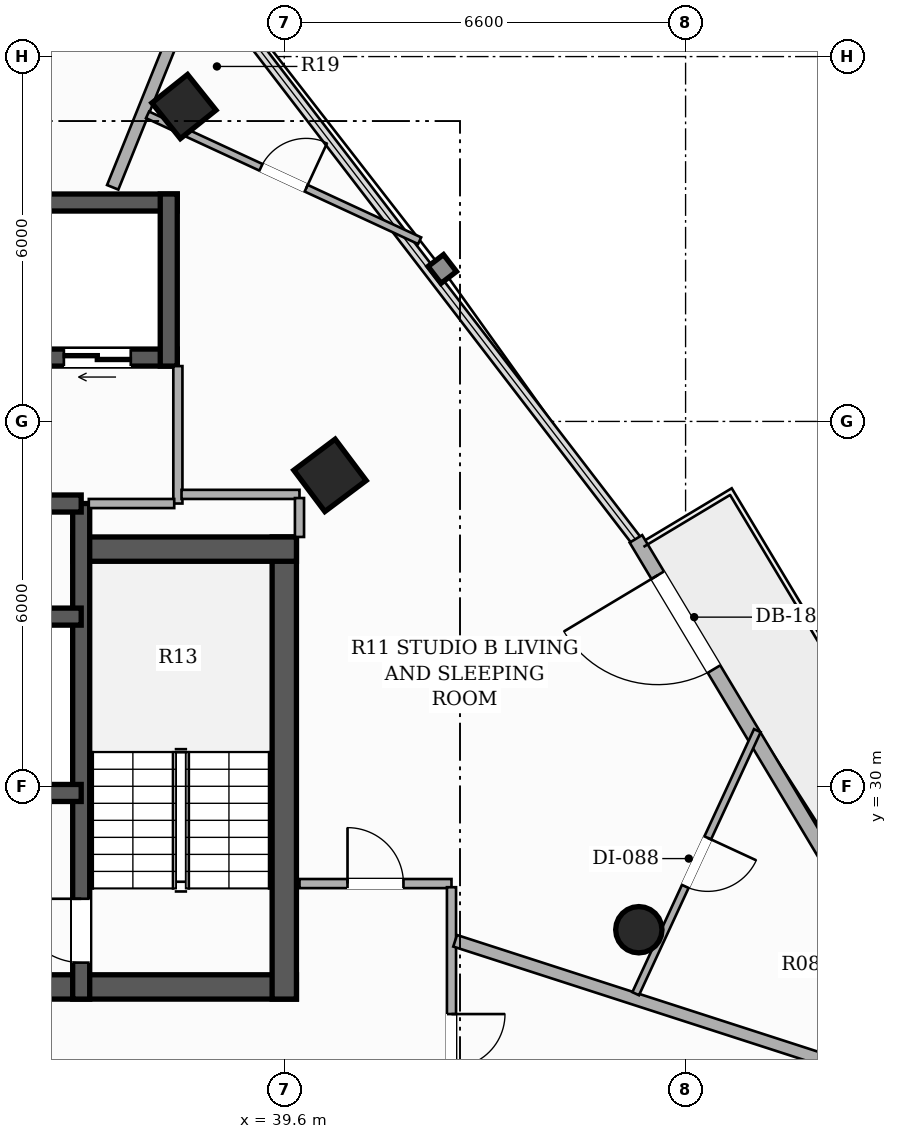
"""IFC4 building model, lengths in metres.
Left out: names, types, materials, properties, quantities, classifications, styles, units other than length and angle.
Written with IfcOpenShell. Run it as: python <this file> out.ifc"""

import sys

from ifc_helpers import new_model, si_unit, direction, frame, frame_2d, origin, origin_2d, place, context, subcontext, project, spatial, rectangle, hollow_rectangle, hollow_circle, extrude, element, fill, save


model = new_model("IFC4")
c1 = context("Model", 3, precision=1e-05, world=origin(), true_north=direction((0.0, 1.0)))
c2 = subcontext(c1, "Body", "Model", "MODEL_VIEW")
j1 = project(units=[si_unit("LENGTHUNIT", "METRE"), si_unit("PLANEANGLEUNIT", "RADIAN")], contexts=[c1])
p1 = place(None, origin())
s1 = spatial("IfcSite", under=j1, at=p1, CompositionType="ELEMENT")
p2 = place(p1, origin())
s2 = spatial("IfcBuilding", under=s1, at=p2, CompositionType="ELEMENT")
p3 = place(p2, frame((0.0, 0.0, 157.25)))
s3 = spatial("IfcBuildingStorey", under=s2, at=p3, CompositionType="ELEMENT", Elevation=157.25)
p4 = place(p3, frame((26.2, 26.7, 0.0), z_axis=(0.0, 0.0, 1.0), x_axis=(1.0, 0.0, 0.0)))
e1 = element("IfcWall", 1, at=p4, inside=s3, PredefinedType="SHEAR", context=c2, shape_type="SweptSolid", body=[
    extrude(rectangle(XDim=13.6, YDim=0.4, at=frame_2d((6.8, 0.0))), origin(), (0.0, 0.0, 1.0), 3.3),
])
p5 = place(p4, frame((4.35, 0.0, 0.0)))
e2 = element("IfcOpeningElement", 2, at=p5, cuts=e1, PredefinedType="OPENING", context=c2, shape_type="SweptSolid", body=[
    extrude(rectangle(XDim=1.05, YDim=2.15, at=frame_2d((0.525, 1.075))), frame((0.0, 0.21, 0.0), z_axis=(0.0, -1.0, 0.0), x_axis=(1.0, 0.0, 0.0)), (0.0, 0.0, 1.0), 0.42),
])
p6 = place(p4, frame((8.3, 0.0, 0.0)))
e3 = element("IfcOpeningElement", 3, at=p6, cuts=e1, PredefinedType="OPENING", context=c2, shape_type="SweptSolid", body=[
    extrude(rectangle(XDim=1.05, YDim=2.15, at=frame_2d((0.525, 1.075))), frame((0.0, 0.21, 0.0), z_axis=(0.0, -1.0, 0.0), x_axis=(1.0, 0.0, 0.0)), (0.0, 0.0, 1.0), 0.42),
])
p7 = place(p3, frame((39.6, 26.5, 0.0), z_axis=(0.0, 0.0, 1.0), x_axis=(0.0, 1.0, 0.0)))
e4 = element("IfcWall", 4, at=p7, inside=s3, PredefinedType="SHEAR", context=c2, shape_type="SweptSolid", body=[
    extrude(rectangle(XDim=7.6, YDim=0.4, at=frame_2d((3.8, 0.0))), origin(), (0.0, 0.0, 1.0), 3.3),
])
p8 = place(p3, frame((36.12, 33.9, 0.0), z_axis=(0.0, 0.0, 1.0), x_axis=(1.0, 0.0, 0.0)))
e5 = element("IfcWall", 5, at=p8, inside=s3, PredefinedType="SHEAR", context=c2, shape_type="SweptSolid", body=[
    extrude(rectangle(XDim=3.68, YDim=0.4, at=frame_2d((1.84, 0.0))), origin(), (0.0, 0.0, 1.0), 3.3),
])
p9 = place(p3, frame((36.26, 26.5, 0.0), z_axis=(0.0, 0.0, 1.0), x_axis=(0.0, 1.0, 0.0)))
e6 = element("IfcWall", 6, at=p9, inside=s3, PredefinedType="SHEAR", context=c2, shape_type="SweptSolid", body=[
    extrude(rectangle(XDim=8.15, YDim=0.28, at=frame_2d((4.075, 0.0))), origin(), (0.0, 0.0, 1.0), 3.3),
])
p10 = place(p9, frame((0.6, 0.0, 0.0)))
e7 = element("IfcOpeningElement", 7, at=p10, cuts=e6, PredefinedType="OPENING", context=c2, shape_type="SweptSolid", body=[
    extrude(rectangle(XDim=1.05, YDim=2.15, at=frame_2d((0.525, 1.075))), frame((0.0, 0.15, 0.0), z_axis=(0.0, -1.0, 0.0), x_axis=(1.0, 0.0, 0.0)), (0.0, 0.0, 1.0), 0.3),
])
p11 = place(p3, frame((36.26, 29.89, 0.0), z_axis=(0.0, 0.0, 1.0), x_axis=(-1.0, 0.0, 0.0)))
e8 = element("IfcWall", 8, at=p11, inside=s3, PredefinedType="SHEAR", context=c2, shape_type="SweptSolid", body=[
    extrude(rectangle(XDim=6.52, YDim=0.28, at=frame_2d((3.26, 0.0))), origin(), (0.0, 0.0, 1.0), 3.3),
])
p12 = place(p11, frame((4.875, 0.0, 0.0)))
e9 = element("IfcOpeningElement", 9, at=p12, cuts=e8, PredefinedType="OPENING", context=c2, shape_type="SweptSolid", body=[
    extrude(rectangle(XDim=1.1, YDim=2.2, at=frame_2d((0.55, 1.1))), frame((0.0, 0.15, 0.0), z_axis=(0.0, -1.0, 0.0), x_axis=(1.0, 0.0, 0.0)), (0.0, 0.0, 1.0), 0.3),
])
p13 = place(p11, frame((2.875, 0.0, 0.0)))
e10 = element("IfcOpeningElement", 10, at=p13, cuts=e8, PredefinedType="OPENING", context=c2, shape_type="SweptSolid", body=[
    extrude(rectangle(XDim=1.1, YDim=2.2, at=frame_2d((0.55, 1.1))), frame((0.0, 0.15, 0.0), z_axis=(0.0, -1.0, 0.0), x_axis=(1.0, 0.0, 0.0)), (0.0, 0.0, 1.0), 0.3),
])
p14 = place(p11, frame((0.6, 0.0, 0.0)))
e11 = element("IfcOpeningElement", 11, at=p14, cuts=e8, PredefinedType="OPENING", context=c2, shape_type="SweptSolid", body=[
    extrude(rectangle(XDim=1.3, YDim=2.2, at=frame_2d((0.65, 1.1))), frame((0.0, 0.15, 0.0), z_axis=(0.0, -1.0, 0.0), x_axis=(1.0, 0.0, 0.0)), (0.0, 0.0, 1.0), 0.3),
])
p15 = place(p3, frame((29.74, 32.79, 0.0), z_axis=(0.0, 0.0, 1.0), x_axis=(1.0, 0.0, 0.0)))
e12 = element("IfcWall", 12, at=p15, inside=s3, PredefinedType="SHEAR", context=c2, shape_type="SweptSolid", body=[
    extrude(rectangle(XDim=6.52, YDim=0.28, at=frame_2d((3.26, 0.0))), origin(), (0.0, 0.0, 1.0), 3.3),
])
p16 = place(p3, frame((29.74, 34.65, 0.0), z_axis=(0.0, 0.0, 1.0), x_axis=(1.0, 0.0, 0.0)))
e13 = element("IfcWall", 13, at=p16, inside=s3, PredefinedType="SHEAR", context=c2, shape_type="SweptSolid", body=[
    extrude(rectangle(XDim=6.52, YDim=0.28, at=frame_2d((3.26, 0.0))), origin(), (0.0, 0.0, 1.0), 3.3),
])
p17 = place(p16, frame((0.515, 0.0, 0.0)))
e14 = element("IfcOpeningElement", 14, at=p17, cuts=e13, PredefinedType="OPENING", context=c2, shape_type="SweptSolid", body=[
    extrude(rectangle(XDim=0.82, YDim=2.1, at=frame_2d((0.41, 1.05))), frame((0.0, 0.15, 0.0), z_axis=(0.0, -1.0, 0.0), x_axis=(1.0, 0.0, 0.0)), (0.0, 0.0, 1.0), 0.3),
])
p18 = place(p16, frame((2.065, 0.0, 0.0)))
e15 = element("IfcOpeningElement", 15, at=p18, cuts=e13, PredefinedType="OPENING", context=c2, shape_type="SweptSolid", body=[
    extrude(rectangle(XDim=0.82, YDim=2.1, at=frame_2d((0.41, 1.05))), frame((0.0, 0.15, 0.0), z_axis=(0.0, -1.0, 0.0), x_axis=(1.0, 0.0, 0.0)), (0.0, 0.0, 1.0), 0.3),
])
p19 = place(p16, frame((3.615, 0.0, 0.0)))
e16 = element("IfcOpeningElement", 16, at=p19, cuts=e13, PredefinedType="OPENING", context=c2, shape_type="SweptSolid", body=[
    extrude(rectangle(XDim=0.82, YDim=2.1, at=frame_2d((0.41, 1.05))), frame((0.0, 0.15, 0.0), z_axis=(0.0, -1.0, 0.0), x_axis=(1.0, 0.0, 0.0)), (0.0, 0.0, 1.0), 0.3),
])
p20 = place(p16, frame((5.165, 0.0, 0.0)))
e17 = element("IfcOpeningElement", 17, at=p20, cuts=e13, PredefinedType="OPENING", context=c2, shape_type="SweptSolid", body=[
    extrude(rectangle(XDim=0.82, YDim=2.1, at=frame_2d((0.41, 1.05))), frame((0.0, 0.15, 0.0), z_axis=(0.0, -1.0, 0.0), x_axis=(1.0, 0.0, 0.0)), (0.0, 0.0, 1.0), 0.3),
])
p21 = place(p3, frame((37.84, 37.05, 0.0), z_axis=(0.0, 0.0, 1.0), x_axis=(-1.0, 0.0, 0.0)))
e18 = element("IfcWall", 18, at=p21, inside=s3, PredefinedType="SHEAR", context=c2, shape_type="SweptSolid", body=[
    extrude(rectangle(XDim=9.68, YDim=0.28, at=frame_2d((4.84, 0.0))), origin(), (0.0, 0.0, 1.0), 3.3),
])
p22 = place(p21, frame((7.815, 0.0, 0.0)))
e19 = element("IfcOpeningElement", 19, at=p22, cuts=e18, PredefinedType="OPENING", context=c2, shape_type="SweptSolid", body=[
    extrude(rectangle(XDim=1.1, YDim=2.2, at=frame_2d((0.55, 1.1))), frame((0.0, 0.15, 0.0), z_axis=(0.0, -1.0, 0.0), x_axis=(1.0, 0.0, 0.0)), (0.0, 0.0, 1.0), 0.3),
])
p23 = place(p21, frame((0.765, 0.0, 0.0)))
e20 = element("IfcOpeningElement", 20, at=p23, cuts=e18, PredefinedType="OPENING", context=c2, shape_type="SweptSolid", body=[
    extrude(rectangle(XDim=1.1, YDim=2.2, at=frame_2d((0.55, 1.1))), frame((0.0, 0.15, 0.0), z_axis=(0.0, -1.0, 0.0), x_axis=(1.0, 0.0, 0.0)), (0.0, 0.0, 1.0), 0.3),
])
p24 = place(p3, frame((28.16, 39.6, 0.0), z_axis=(0.0, 0.0, 1.0), x_axis=(1.0, 0.0, 0.0)))
e21 = element("IfcWall", 21, at=p24, inside=s3, PredefinedType="SHEAR", context=c2, shape_type="SweptSolid", body=[
    extrude(rectangle(XDim=9.68, YDim=0.28, at=frame_2d((4.84, 0.0))), origin(), (0.0, 0.0, 1.0), 3.3),
])
p25 = place(p3, frame((37.7, 36.91, 0.0), z_axis=(0.0, 0.0, 1.0), x_axis=(0.0, 1.0, 0.0)))
e22 = element("IfcWall", 22, at=p25, inside=s3, PredefinedType="SHEAR", context=c2, shape_type="SweptSolid", body=[
    extrude(rectangle(XDim=2.83, YDim=0.28, at=frame_2d((1.415, 0.0))), origin(), (0.0, 0.0, 1.0), 3.3),
])
p26 = place(p3, frame((45.431, 27.641, 0.0), z_axis=(0.0, 0.0, 1.0), x_axis=(1.0, 0.0, 0.0)))
e23 = element("IfcColumn", 23, at=p26, inside=s3, PredefinedType="COLUMN", context=c2, shape_type="SweptSolid", body=[
    extrude(hollow_circle(Radius=0.381, WallThickness=0.022, at=origin_2d()), origin(), (0.0, 0.0, 1.0), 3.3),
])
p27 = place(p3, frame((40.352, 35.113, 0.0), z_axis=(0.0, 0.0, 1.0), x_axis=(-0.600420225326, 0.799684658487, 0.0)))
e24 = element("IfcColumn", 24, at=p27, inside=s3, PredefinedType="COLUMN", context=c2, shape_type="SweptSolid", body=[
    extrude(hollow_rectangle(XDim=0.85, YDim=0.85, WallThickness=0.028, at=origin_2d()), origin(), (0.0, 0.0, 1.0), 3.3),
])
p28 = place(p3, frame((37.95, 41.178, 0.0), z_axis=(0.0, 0.0, 1.0), x_axis=(-0.623879596709, 0.781520472419, 0.0)))
e25 = element("IfcColumn", 25, at=p28, inside=s3, PredefinedType="COLUMN", context=c2, shape_type="SweptSolid", body=[
    extrude(hollow_rectangle(XDim=0.75, YDim=0.75, WallThickness=0.025, at=origin_2d()), origin(), (0.0, 0.0, 1.0), 3.3),
])
p29 = place(p3, frame((51.155, 24.445, 0.0), z_axis=(0.0, 0.0, 1.0), x_axis=(-0.514335781973, 0.857588889493, 0.0)))
e26 = element("IfcWall", 26, at=p29, inside=s3, PredefinedType="SOLIDWALL", context=c2, shape_type="SweptSolid", body=[
    extrude(rectangle(XDim=11.222, YDim=0.24, at=frame_2d((5.611, 0.0))), origin(), (0.0, 0.0, 1.0), 2.624),
])
p30 = place(p29, frame((8.725, 0.0, 0.0)))
e27 = element("IfcOpeningElement", 27, at=p30, cuts=e26, PredefinedType="OPENING", context=c2, shape_type="SweptSolid", body=[
    extrude(rectangle(XDim=1.8, YDim=2.2, at=frame_2d((0.9, 1.1))), frame((0.0, 0.13, 0.0), z_axis=(0.0, -1.0, 0.0), x_axis=(1.0, 0.0, 0.0)), (0.0, 0.0, 1.0), 0.26),
])
p31 = place(p3, frame((37.85, 34.65, 0.0), z_axis=(0.0, 0.0, 1.0), x_axis=(0.0, 1.0, 0.0)))
e28 = element("IfcWall", 28, at=p31, inside=s3, PredefinedType="PARTITIONING", context=c2, shape_type="SweptSolid", body=[
    extrude(rectangle(XDim=2.26, YDim=0.15, at=frame_2d((1.13, 0.0))), origin(), (0.0, 0.0, 1.0), 3.06),
])
p32 = place(p3, frame((36.385, 34.65, 0.0), z_axis=(0.0, 0.0, 1.0), x_axis=(1.0, 0.0, 0.0)))
e29 = element("IfcWall", 29, at=p32, inside=s3, PredefinedType="PARTITIONING", context=c2, shape_type="SweptSolid", body=[
    extrude(rectangle(XDim=1.405, YDim=0.15, at=frame_2d((0.703, 0.0))), origin(), (0.0, 0.0, 1.0), 2.425),
])
p33 = place(p3, frame((39.85, 28.4, 0.0), z_axis=(0.0, 0.0, 1.0), x_axis=(1.0, 0.0, 0.0)))
e30 = element("IfcWall", 30, at=p33, inside=s3, PredefinedType="PARTITIONING", context=c2, shape_type="SweptSolid", body=[
    extrude(rectangle(XDim=2.5, YDim=0.15, at=frame_2d((1.25, 0.0))), origin(), (0.0, 0.0, 1.0), 2.721),
])
p34 = place(p33, frame((0.79, 0.0, 0.0)))
e31 = element("IfcOpeningElement", 31, at=p34, cuts=e30, PredefinedType="OPENING", context=c2, shape_type="SweptSolid", body=[
    extrude(rectangle(XDim=0.92, YDim=2.15, at=frame_2d((0.46, 1.075))), frame((0.0, 0.085, 0.0), z_axis=(0.0, -1.0, 0.0), x_axis=(1.0, 0.0, 0.0)), (0.0, 0.0, 1.0), 0.17),
])
p35 = place(p3, frame((42.35, 28.34, 0.0), z_axis=(0.0, 0.0, 1.0), x_axis=(0.0, -1.0, 0.0)))
e32 = element("IfcWall", 32, at=p35, inside=s3, PredefinedType="PARTITIONING", context=c2, shape_type="SweptSolid", body=[
    extrude(rectangle(XDim=4.49, YDim=0.15, at=frame_2d((2.245, 0.0))), origin(), (0.0, 0.0, 1.0), 2.721),
])
p36 = place(p35, frame((2.086, 0.0, 0.0)))
e33 = element("IfcOpeningElement", 33, at=p36, cuts=e32, PredefinedType="OPENING", context=c2, shape_type="SweptSolid", body=[
    extrude(rectangle(XDim=0.88, YDim=2.1, at=frame_2d((0.44, 1.05))), frame((0.0, 0.085, 0.0), z_axis=(0.0, -1.0, 0.0), x_axis=(1.0, 0.0, 0.0)), (0.0, 0.0, 1.0), 0.17),
])
p37 = place(p3, frame((37.91, 34.8, 0.0), z_axis=(0.0, 0.0, 1.0), x_axis=(1.0, 0.0, 0.0)))
e34 = element("IfcWall", 34, at=p37, inside=s3, PredefinedType="PARTITIONING", context=c2, shape_type="SweptSolid", body=[
    extrude(rectangle(XDim=1.94, YDim=0.15, at=frame_2d((0.97, 0.0))), origin(), (0.0, 0.0, 1.0), 2.721),
])
p38 = place(p3, frame((39.85, 34.74, 0.0), z_axis=(0.0, 0.0, 1.0), x_axis=(0.0, -1.0, 0.0)))
e35 = element("IfcWall", 35, at=p38, inside=s3, PredefinedType="PARTITIONING", context=c2, shape_type="SweptSolid", body=[
    extrude(rectangle(XDim=0.64, YDim=0.15, at=frame_2d((0.32, 0.0))), origin(), (0.0, 0.0, 1.0), 2.721),
])
p39 = place(p3, frame((42.41, 27.459, 0.0), z_axis=(0.0, 0.0, 1.0), x_axis=(0.951531988225, -0.307549793343, 0.0)))
e36 = element("IfcWall", 36, at=p39, inside=s3, PredefinedType="PARTITIONING", context=c2, shape_type="SweptSolid", body=[
    extrude(rectangle(XDim=9.036, YDim=0.2, at=frame_2d((4.518, 0.0))), origin(), (0.0, 0.0, 1.0), 2.413),
])
p40 = place(p3, frame((36.778, 39.85, 0.0), z_axis=(0.0, 0.0, 1.0), x_axis=(0.374430412004, 0.927255017008, 0.0)))
e37 = element("IfcWall", 37, at=p40, inside=s3, PredefinedType="PARTITIONING", context=c2, shape_type="SweptSolid", body=[
    extrude(rectangle(XDim=3.958, YDim=0.2, at=frame_2d((1.979, 0.0))), origin(), (0.0, 0.0, 1.0), 2.413),
])
p41 = place(p3, frame((37.351, 41.042, 0.0), z_axis=(0.0, 0.0, 1.0), x_axis=(0.907592371503, -0.419852458834, 0.0)))
e38 = element("IfcWall", 38, at=p41, inside=s3, PredefinedType="PARTITIONING", context=c2, shape_type="SweptSolid", body=[
    extrude(rectangle(XDim=4.93, YDim=0.12, at=frame_2d((2.465, 0.0))), origin(), (0.0, 0.0, 1.0), 2.413),
])
p42 = place(p41, frame((2.055, 0.0, 0.0)))
e39 = element("IfcOpeningElement", 39, at=p42, cuts=e38, PredefinedType="OPENING", context=c2, shape_type="SweptSolid", body=[
    extrude(rectangle(XDim=0.82, YDim=2.1, at=frame_2d((0.41, 1.05))), frame((0.0, 0.07, 0.0), z_axis=(0.0, -1.0, 0.0), x_axis=(1.0, 0.0, 0.0)), (0.0, 0.0, 1.0), 0.14),
])
p43 = place(p3, frame((47.38, 30.915, 0.0), z_axis=(0.0, 0.0, 1.0), x_axis=(-0.419818119852, -0.907608255936, 0.0)))
e40 = element("IfcWall", 40, at=p43, inside=s3, PredefinedType="PARTITIONING", context=c2, shape_type="SweptSolid", body=[
    extrude(rectangle(XDim=4.766, YDim=0.12, at=frame_2d((2.383, 0.0))), origin(), (0.0, 0.0, 1.0), 2.413),
])
p44 = place(p43, frame((1.943, 0.0, 0.0)))
e41 = element("IfcOpeningElement", 41, at=p44, cuts=e40, PredefinedType="OPENING", context=c2, shape_type="SweptSolid", body=[
    extrude(rectangle(XDim=0.88, YDim=2.1, at=frame_2d((0.44, 1.05))), frame((0.0, 0.07, 0.0), z_axis=(0.0, -1.0, 0.0), x_axis=(1.0, 0.0, 0.0)), (0.0, 0.0, 1.0), 0.14),
])
p45 = place(p30, origin())
e42 = element("IfcDoor", 42, at=p45, inside=s3, OperationType="SINGLE_SWING_RIGHT", PredefinedType="DOOR", context=c2, shape_type="SweptSolid", body=[
    extrude(rectangle(XDim=1.8, YDim=2.2, at=frame_2d((0.9, 1.1))), frame((0.0, 0.025, 0.0), z_axis=(0.0, -1.0, 0.0), x_axis=(1.0, 0.0, 0.0)), (0.0, 0.0, 1.0), 0.05),
])
fill(e27, e42)
p46 = place(p10, origin())
e43 = element("IfcDoor", 43, at=p46, inside=s3, OperationType="SINGLE_SWING_RIGHT", PredefinedType="DOOR", context=c2, shape_type="SweptSolid", body=[
    extrude(rectangle(XDim=1.05, YDim=2.15, at=frame_2d((0.525, 1.075))), frame((0.0, 0.025, 0.0), z_axis=(0.0, -1.0, 0.0), x_axis=(1.0, 0.0, 0.0)), (0.0, 0.0, 1.0), 0.05),
])
fill(e7, e43)
p47 = place(p23, origin())
e44 = element("IfcDoor", 44, at=p47, inside=s3, OperationType="DOUBLE_DOOR_SLIDING", PredefinedType="DOOR", context=c2, shape_type="SweptSolid", body=[
    extrude(rectangle(XDim=1.1, YDim=2.2, at=frame_2d((0.55, 1.1))), frame((0.0, 0.025, 0.0), z_axis=(0.0, -1.0, 0.0), x_axis=(1.0, 0.0, 0.0)), (0.0, 0.0, 1.0), 0.05),
])
fill(e20, e44)
p48 = place(p36, origin())
e45 = element("IfcDoor", 45, at=p48, inside=s3, OperationType="SINGLE_SWING_LEFT", PredefinedType="DOOR", context=c2, shape_type="SweptSolid", body=[
    extrude(rectangle(XDim=0.88, YDim=2.1, at=frame_2d((0.44, 1.05))), frame((0.0, 0.025, 0.0), z_axis=(0.0, -1.0, 0.0), x_axis=(1.0, 0.0, 0.0)), (0.0, 0.0, 1.0), 0.05),
])
fill(e33, e45)
p49 = place(p34, origin())
e46 = element("IfcDoor", 46, at=p49, inside=s3, OperationType="SINGLE_SWING_LEFT", PredefinedType="DOOR", context=c2, shape_type="SweptSolid", body=[
    extrude(rectangle(XDim=0.92, YDim=2.15, at=frame_2d((0.46, 1.075))), frame((0.0, 0.025, 0.0), z_axis=(0.0, -1.0, 0.0), x_axis=(1.0, 0.0, 0.0)), (0.0, 0.0, 1.0), 0.05),
])
fill(e31, e46)
p50 = place(p42, origin())
e47 = element("IfcDoor", 47, at=p50, inside=s3, OperationType="SINGLE_SWING_RIGHT", PredefinedType="DOOR", context=c2, shape_type="SweptSolid", body=[
    extrude(rectangle(XDim=0.82, YDim=2.1, at=frame_2d((0.41, 1.05))), frame((0.0, 0.025, 0.0), z_axis=(0.0, -1.0, 0.0), x_axis=(1.0, 0.0, 0.0)), (0.0, 0.0, 1.0), 0.05),
])
fill(e39, e47)
p51 = place(p44, origin())
e48 = element("IfcDoor", 48, at=p51, inside=s3, OperationType="SINGLE_SWING_LEFT", PredefinedType="DOOR", context=c2, shape_type="SweptSolid", body=[
    extrude(rectangle(XDim=0.88, YDim=2.1, at=frame_2d((0.44, 1.05))), frame((0.0, 0.025, 0.0), z_axis=(0.0, -1.0, 0.0), x_axis=(1.0, 0.0, 0.0)), (0.0, 0.0, 1.0), 0.05),
])
fill(e41, e48)
save(model, sys.argv[1])
